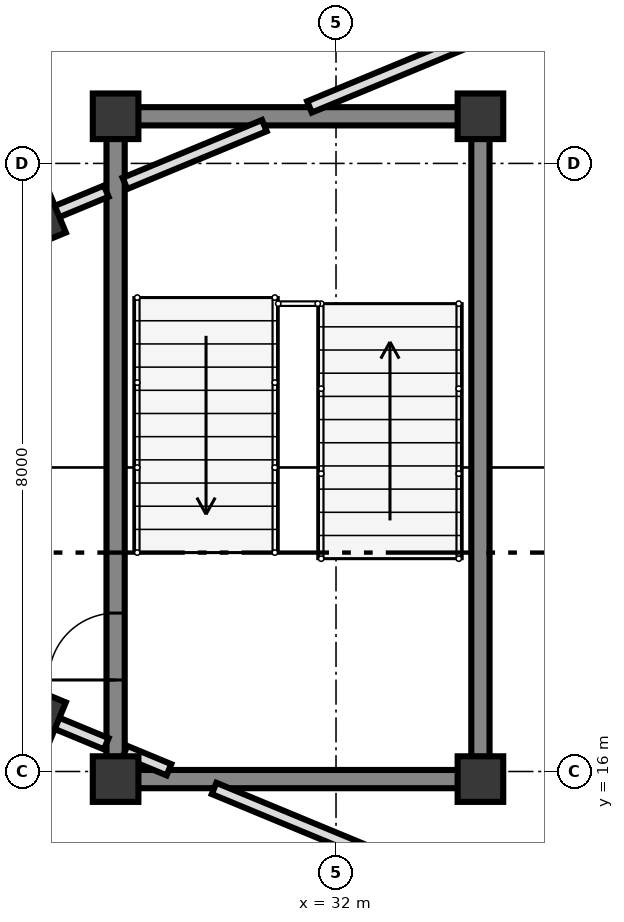
"""IFC4 building model, lengths in metres.
Left out: names, types, materials, properties, quantities, classifications, styles, units other than length and angle.
Written with IfcOpenShell. Run it as: python <this file> out.ifc"""

import sys

from ifc_helpers import new_model, si_unit, direction, frame, frame_2d, origin, origin_2d, place, context, subcontext, project, spatial, rectangle, extrude, element, fill, save


model = new_model("IFC4")
c1 = context("Model", 3, precision=1e-05, world=origin(), true_north=direction((0.0, 1.0)))
c2 = subcontext(c1, "Body", "Model", "MODEL_VIEW")
j1 = project(units=[si_unit("LENGTHUNIT", "METRE"), si_unit("PLANEANGLEUNIT", "RADIAN")], contexts=[c1])
p1 = place(None, origin())
s1 = spatial("IfcSite", under=j1, at=p1, CompositionType="ELEMENT")
p2 = place(p1, origin())
s2 = spatial("IfcBuilding", under=s1, at=p2, CompositionType="ELEMENT")
p3 = place(p2, origin())
s3 = spatial("IfcBuildingStorey", under=s2, at=p3, CompositionType="ELEMENT", Elevation=0.0)
for number, where, z_axis, x_axis in (
    (1, (29.1, 15.9, 0.0), (0.0, 0.0, 1.0), (1.0, 0.0, 0.0)),
    (2, (33.9, 15.9, 0.0), (0.0, 0.0, 1.0), (1.0, 0.0, 0.0)),
    (3, (33.9, 24.62, 0.0), (0.0, 0.0, 1.0), (1.0, 0.0, 0.0)),
    (4, (29.1, 24.62, 0.0), (0.0, 0.0, 1.0), (1.0, 0.0, 0.0)),
    (5, (28.053, 23.253, 0.0), (0.0, 0.0, 1.0), (0.924, 0.383, 0.0)),
    (6, (28.053, 16.747, 0.0), (0.0, 0.0, 1.0), (0.924, -0.383, 0.0)),
):
    element("IfcColumn", number, at=place(p3, frame(where, z_axis=z_axis, x_axis=x_axis)), inside=s3, PredefinedType="COLUMN", context=c2, shape_type="SweptSolid", body=[
        extrude(rectangle(XDim=0.6, YDim=0.6, at=origin_2d()), origin(), (0.0, 0.0, 1.0), 4.5),
    ])
p4 = place(p3, frame((29.1, 16.192, 0.0), z_axis=(0.0, 0.0, 1.0), x_axis=(0.0, 1.0, 0.0)))
e7 = element("IfcWall", 7, at=p4, inside=s3, PredefinedType="SHEAR", context=c2, shape_type="SweptSolid", body=[
    extrude(rectangle(XDim=8.136, YDim=0.24, at=frame_2d((4.068, 0.0))), origin(), (0.0, 0.0, 1.0), 4.24),
])
p5 = place(p4, frame((1.012, 0.0, 0.0)))
e8 = element("IfcOpeningElement", 8, at=p5, cuts=e7, PredefinedType="OPENING", context=c2, shape_type="SweptSolid", body=[
    extrude(rectangle(XDim=0.88, YDim=2.1, at=frame_2d((0.44, 1.05))), frame((0.0, 0.13, 0.0), z_axis=(0.0, -1.0, 0.0), x_axis=(1.0, 0.0, 0.0)), (0.0, 0.0, 1.0), 0.26),
])
p6 = place(p3, frame((33.9, 24.328, 0.0), z_axis=(0.0, 0.0, 1.0), x_axis=(0.0, -1.0, 0.0)))
e9 = element("IfcWall", 9, at=p6, inside=s3, PredefinedType="SHEAR", context=c2, shape_type="SweptSolid", body=[
    extrude(rectangle(XDim=8.136, YDim=0.24, at=frame_2d((4.068, 0.0))), origin(), (0.0, 0.0, 1.0), 4.24),
])
for number, where, z_axis, x_axis in (
    (10, (33.608, 15.9, 0.0), (0.0, 0.0, 1.0), (-1.0, 0.0, 0.0)),
    (11, (33.608, 24.62, 0.0), (0.0, 0.0, 1.0), (-1.0, 0.0, 0.0)),
):
    element("IfcWall", number, at=place(p3, frame(where, z_axis=z_axis, x_axis=x_axis)), inside=s3, PredefinedType="SHEAR", context=c2, shape_type="SweptSolid", body=[
        extrude(rectangle(XDim=4.216, YDim=0.24, at=frame_2d((2.108, 0.0))), origin(), (0.0, 0.0, 1.0), 4.24),
    ])
p7 = place(p3, frame((28.323, 23.364, 0.0), z_axis=(0.0, 0.0, 1.0), x_axis=(0.923840285319, 0.382778169729, 0.0)))
e12 = element("IfcWall", 12, at=p7, inside=s3, PredefinedType="PARTITIONING", context=c2, shape_type="SweptSolid", body=[
    extrude(rectangle(XDim=0.708, YDim=0.16, at=frame_2d((0.354, 0.0))), origin(), (0.0, 0.0, 1.0), 4.2),
])
p8 = place(p3, frame((29.223, 23.737, 0.0), z_axis=(0.0, 0.0, 1.0), x_axis=(0.923817443679, 0.382833293686, 0.0)))
e13 = element("IfcWall", 13, at=p8, inside=s3, PredefinedType="PARTITIONING", context=c2, shape_type="SweptSolid", body=[
    extrude(rectangle(XDim=1.985, YDim=0.16, at=frame_2d((0.993, 0.0))), origin(), (0.0, 0.0, 1.0), 4.2),
])
p9 = place(p3, frame((31.651, 24.743, 0.0), z_axis=(0.0, 0.0, 1.0), x_axis=(0.923842829076, 0.38277203028, 0.0)))
e14 = element("IfcWall", 14, at=p9, inside=s3, PredefinedType="PARTITIONING", context=c2, shape_type="SweptSolid", body=[
    extrude(rectangle(XDim=4.789, YDim=0.16, at=frame_2d((2.395, 0.0))), origin(), (0.0, 0.0, 1.0), 4.2),
])
p10 = place(p3, frame((28.323, 16.636, 0.0), z_axis=(0.0, 0.0, 1.0), x_axis=(0.923840285319, -0.382778169729, 0.0)))
e15 = element("IfcWall", 15, at=p10, inside=s3, PredefinedType="PARTITIONING", context=c2, shape_type="SweptSolid", body=[
    extrude(rectangle(XDim=0.708, YDim=0.16, at=frame_2d((0.354, 0.0))), origin(), (0.0, 0.0, 1.0), 3.552),
])
p11 = place(p3, frame((29.223, 16.263, 0.0), z_axis=(0.0, 0.0, 1.0), x_axis=(0.923812676193, -0.382844797933, 0.0)))
e16 = element("IfcWall", 16, at=p11, inside=s3, PredefinedType="PARTITIONING", context=c2, shape_type="SweptSolid", body=[
    extrude(rectangle(XDim=0.627, YDim=0.16, at=frame_2d((0.313, 0.0))), origin(), (0.0, 0.0, 1.0), 3.552),
])
p12 = place(p3, frame((30.396, 15.777, 0.0), z_axis=(0.0, 0.0, 1.0), x_axis=(0.923837705987, -0.382784394923, 0.0)))
e17 = element("IfcWall", 17, at=p12, inside=s3, PredefinedType="PARTITIONING", context=c2, shape_type="SweptSolid", body=[
    extrude(rectangle(XDim=6.147, YDim=0.16, at=frame_2d((3.074, 0.0))), origin(), (0.0, 0.0, 1.0), 3.552),
])
p13 = place(p5, origin())
e18 = element("IfcDoor", 18, at=p13, inside=s3, OperationType="SINGLE_SWING_LEFT", PredefinedType="DOOR", context=c2, shape_type="SweptSolid", body=[
    extrude(rectangle(XDim=0.88, YDim=2.1, at=frame_2d((0.44, 1.05))), frame((0.0, 0.025, 0.0), z_axis=(0.0, -1.0, 0.0), x_axis=(1.0, 0.0, 0.0)), (0.0, 0.0, 1.0), 0.05),
])
fill(e8, e18)
save(model, sys.argv[1])
